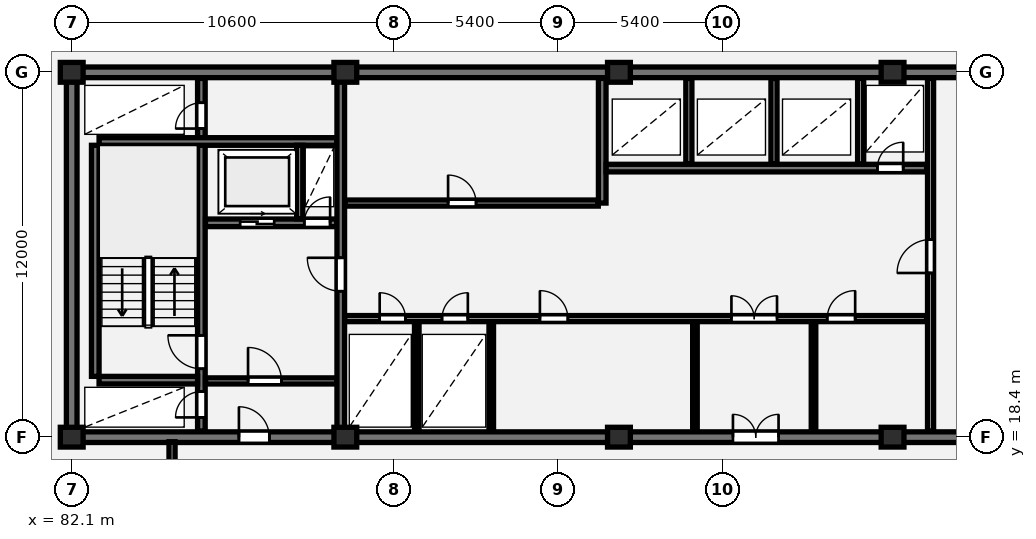
"""IFC4 building model, lengths in metres.
Left out: names, types, materials, properties, quantities, classifications, styles, units other than length and angle.
Written with IfcOpenShell. Run it as: python <this file> out.ifc"""

import sys

from ifc_helpers import new_model, si_unit, direction, frame, frame_2d, origin, origin_2d, place, context, subcontext, project, spatial, rectangle, extrude, element, fill, save


model = new_model("IFC4")
c1 = context("Model", 3, precision=1e-05, world=origin(), true_north=direction((0.0, 1.0)))
c2 = subcontext(c1, "Body", "Model", "MODEL_VIEW")
j1 = project(units=[si_unit("LENGTHUNIT", "METRE"), si_unit("PLANEANGLEUNIT", "RADIAN")], contexts=[c1])
p1 = place(None, origin())
s1 = spatial("IfcSite", under=j1, at=p1, CompositionType="ELEMENT")
p2 = place(p1, origin())
s2 = spatial("IfcBuilding", under=s1, at=p2, CompositionType="ELEMENT")
p3 = place(p2, frame((0.0, 0.0, 204.35)))
s3 = spatial("IfcBuildingStorey", under=s2, at=p3, CompositionType="ELEMENT", Elevation=204.35)
for number, where, z_axis, x_axis in (
    (1, (82.1, 18.4, 0.0), (0.0, 0.0, 1.0), (1.0, 0.0, 0.0)),
    (2, (82.1, 30.4, 0.0), (0.0, 0.0, 1.0), (1.0, 0.0, 0.0)),
    (3, (91.1, 18.4, 0.0), (0.0, 0.0, 1.0), (1.0, 0.0, 0.0)),
    (4, (91.1, 30.4, 0.0), (0.0, 0.0, 1.0), (1.0, 0.0, 0.0)),
    (5, (100.1, 18.4, 0.0), (0.0, 0.0, 1.0), (1.0, 0.0, 0.0)),
    (6, (100.1, 30.4, 0.0), (0.0, 0.0, 1.0), (1.0, 0.0, 0.0)),
    (7, (109.1, 18.4, 0.0), (0.0, 0.0, 1.0), (1.0, 0.0, 0.0)),
    (8, (109.1, 30.4, 0.0), (0.0, 0.0, 1.0), (1.0, 0.0, 0.0)),
):
    element("IfcColumn", number, at=place(p3, frame(where, z_axis=z_axis, x_axis=x_axis)), inside=s3, PredefinedType="COLUMN", context=c2, shape_type="SweptSolid", body=[
        extrude(rectangle(XDim=0.75, YDim=0.65, at=origin_2d()), origin(), (0.0, 0.0, 1.0), 3.25),
    ])
p4 = place(p3, frame((81.925, 30.4, 0.0), z_axis=(0.0, 0.0, 1.0), x_axis=(1.0, 0.0, 0.0)))
e9 = element("IfcWall", 9, at=p4, inside=s3, PredefinedType="SHEAR", context=c2, shape_type="SweptSolid", body=[
    extrude(rectangle(XDim=36.265, YDim=0.35, at=frame_2d((18.132, 0.0))), origin(), (0.0, 0.0, 1.0), 3.25),
])
p5 = place(p3, frame((82.1, 18.575, 0.0), z_axis=(0.0, 0.0, 1.0), x_axis=(0.0, 1.0, 0.0)))
e10 = element("IfcWall", 10, at=p5, inside=s3, PredefinedType="SHEAR", context=c2, shape_type="SweptSolid", body=[
    extrude(rectangle(XDim=11.65, YDim=0.35, at=frame_2d((5.825, 0.0))), origin(), (0.0, 0.0, 1.0), 3.25),
])
p6 = place(p3, frame((81.925, 18.4, 0.0), z_axis=(0.0, 0.0, 1.0), x_axis=(1.0, 0.0, 0.0)))
e11 = element("IfcWall", 11, at=p6, inside=s3, PredefinedType="SHEAR", context=c2, shape_type="SweptSolid", body=[
    extrude(rectangle(XDim=36.265, YDim=0.35, at=frame_2d((18.132, 0.0))), origin(), (0.0, 0.0, 1.0), 3.25),
])
p7 = place(p6, frame((5.675, 0.0, 0.0)))
e12 = element("IfcOpeningElement", 12, at=p7, cuts=e11, PredefinedType="OPENING", context=c2, shape_type="SweptSolid", body=[
    extrude(rectangle(XDim=1.0, YDim=2.15, at=frame_2d((0.5, 1.075))), frame((0.0, 0.185, 0.0), z_axis=(0.0, -1.0, 0.0), x_axis=(1.0, 0.0, 0.0)), (0.0, 0.0, 1.0), 0.37),
])
p8 = place(p6, frame((21.925, 0.0, 0.0)))
e13 = element("IfcOpeningElement", 13, at=p8, cuts=e11, PredefinedType="OPENING", context=c2, shape_type="SweptSolid", body=[
    extrude(rectangle(XDim=1.5, YDim=2.2, at=frame_2d((0.75, 1.1))), frame((0.0, 0.185, 0.0), z_axis=(0.0, -1.0, 0.0), x_axis=(1.0, 0.0, 0.0)), (0.0, 0.0, 1.0), 0.37),
])
p9 = place(p6, frame((29.875, 0.0, 0.0)))
e14 = element("IfcOpeningElement", 14, at=p9, cuts=e11, PredefinedType="OPENING", context=c2, shape_type="SweptSolid", body=[
    extrude(rectangle(XDim=1.0, YDim=2.15, at=frame_2d((0.5, 1.075))), frame((0.0, 0.185, 0.0), z_axis=(0.0, -1.0, 0.0), x_axis=(1.0, 0.0, 0.0)), (0.0, 0.0, 1.0), 0.37),
])
p10 = place(p3, frame((82.875, 20.4, 0.0), z_axis=(0.0, 0.0, 1.0), x_axis=(0.0, 1.0, 0.0)))
e15 = element("IfcWall", 15, at=p10, inside=s3, PredefinedType="SHEAR", context=c2, shape_type="SweptSolid", body=[
    extrude(rectangle(XDim=7.6, YDim=0.25, at=frame_2d((3.8, 0.0))), origin(), (0.0, 0.0, 1.0), 3.25),
])
p11 = place(p3, frame((86.365, 18.6, 0.0), z_axis=(0.0, 0.0, 1.0), x_axis=(0.0, 1.0, 0.0)))
e16 = element("IfcWall", 16, at=p11, inside=s3, PredefinedType="SHEAR", context=c2, shape_type="SweptSolid", body=[
    extrude(rectangle(XDim=11.6, YDim=0.25, at=frame_2d((5.8, 0.0))), origin(), (0.0, 0.0, 1.0), 3.25),
])
p12 = place(p11, frame((0.45, 0.0, 0.0)))
e17 = element("IfcOpeningElement", 17, at=p12, cuts=e16, PredefinedType="OPENING", context=c2, shape_type="SweptSolid", body=[
    extrude(rectangle(XDim=0.85, YDim=2.05, at=frame_2d((0.425, 1.025))), frame((0.0, 0.135, 0.0), z_axis=(0.0, -1.0, 0.0), x_axis=(1.0, 0.0, 0.0)), (0.0, 0.0, 1.0), 0.27),
])
p13 = place(p11, frame((2.05, 0.0, 0.0)))
e18 = element("IfcOpeningElement", 18, at=p13, cuts=e16, PredefinedType="OPENING", context=c2, shape_type="SweptSolid", body=[
    extrude(rectangle(XDim=1.1, YDim=2.1, at=frame_2d((0.55, 1.05))), frame((0.0, 0.135, 0.0), z_axis=(0.0, -1.0, 0.0), x_axis=(1.0, 0.0, 0.0)), (0.0, 0.0, 1.0), 0.27),
])
p14 = place(p11, frame((9.95, 0.0, 0.0)))
e19 = element("IfcOpeningElement", 19, at=p14, cuts=e16, PredefinedType="OPENING", context=c2, shape_type="SweptSolid", body=[
    extrude(rectangle(XDim=0.85, YDim=2.05, at=frame_2d((0.425, 1.025))), frame((0.0, 0.135, 0.0), z_axis=(0.0, -1.0, 0.0), x_axis=(1.0, 0.0, 0.0)), (0.0, 0.0, 1.0), 0.27),
])
p15 = place(p3, frame((83.0, 20.275, 0.0), z_axis=(0.0, 0.0, 1.0), x_axis=(1.0, 0.0, 0.0)))
e20 = element("IfcWall", 20, at=p15, inside=s3, PredefinedType="SHEAR", context=c2, shape_type="SweptSolid", body=[
    extrude(rectangle(XDim=3.24, YDim=0.25, at=frame_2d((1.62, 0.0))), origin(), (0.0, 0.0, 1.0), 3.25),
])
p16 = place(p3, frame((83.0, 28.125, 0.0), z_axis=(0.0, 0.0, 1.0), x_axis=(1.0, 0.0, 0.0)))
e21 = element("IfcWall", 21, at=p16, inside=s3, PredefinedType="SHEAR", context=c2, shape_type="SweptSolid", body=[
    extrude(rectangle(XDim=7.82, YDim=0.25, at=frame_2d((3.91, 0.0))), origin(), (0.0, 0.0, 1.0), 3.25),
])
p17 = place(p3, frame((86.5, 25.45, 0.0), z_axis=(0.0, 0.0, 1.0), x_axis=(1.0, 0.0, 0.0)))
e22 = element("IfcWall", 22, at=p17, inside=s3, PredefinedType="SHEAR", context=c2, shape_type="SweptSolid", body=[
    extrude(rectangle(XDim=4.32, YDim=0.25, at=frame_2d((2.16, 0.0))), origin(), (0.0, 0.0, 1.0), 3.25),
])
p18 = place(p17, frame((1.14, 0.0, 0.0)))
e23 = element("IfcOpeningElement", 23, at=p18, cuts=e22, PredefinedType="OPENING", context=c2, shape_type="SweptSolid", body=[
    extrude(rectangle(XDim=1.12, YDim=2.12, at=frame_2d((0.56, 1.06))), frame((0.0, 0.135, 0.0), z_axis=(0.0, -1.0, 0.0), x_axis=(1.0, 0.0, 0.0)), (0.0, 0.0, 1.0), 0.27),
])
p19 = place(p17, frame((3.25, 0.0, 0.0)))
e24 = element("IfcOpeningElement", 24, at=p19, cuts=e22, PredefinedType="OPENING", context=c2, shape_type="SweptSolid", body=[
    extrude(rectangle(XDim=0.85, YDim=2.05, at=frame_2d((0.425, 1.025))), frame((0.0, 0.135, 0.0), z_axis=(0.0, -1.0, 0.0), x_axis=(1.0, 0.0, 0.0)), (0.0, 0.0, 1.0), 0.27),
])
p20 = place(p3, frame((89.6, 25.58, 0.0), z_axis=(0.0, 0.0, 1.0), x_axis=(0.0, 1.0, 0.0)))
e25 = element("IfcWall", 25, at=p20, inside=s3, PredefinedType="PARTITIONING", context=c2, shape_type="SweptSolid", body=[
    extrude(rectangle(XDim=2.42, YDim=0.2, at=frame_2d((1.21, 0.0))), origin(), (0.0, 0.0, 1.0), 2.98),
])
p21 = place(p3, frame((86.5, 20.25, 0.0), z_axis=(0.0, 0.0, 1.0), x_axis=(1.0, 0.0, 0.0)))
e26 = element("IfcWall", 26, at=p21, inside=s3, PredefinedType="PARTITIONING", context=c2, shape_type="SweptSolid", body=[
    extrude(rectangle(XDim=4.32, YDim=0.2, at=frame_2d((2.16, 0.0))), origin(), (0.0, 0.0, 1.0), 2.98),
])
p22 = place(p21, frame((1.4, 0.0, 0.0)))
e27 = element("IfcOpeningElement", 27, at=p22, cuts=e26, PredefinedType="OPENING", context=c2, shape_type="SweptSolid", body=[
    extrude(rectangle(XDim=1.1, YDim=2.1, at=frame_2d((0.55, 1.05))), frame((0.0, 0.11, 0.0), z_axis=(0.0, -1.0, 0.0), x_axis=(1.0, 0.0, 0.0)), (0.0, 0.0, 1.0), 0.22),
])
p23 = place(p3, frame((90.95, 18.6, 0.0), z_axis=(0.0, 0.0, 1.0), x_axis=(0.0, 1.0, 0.0)))
e28 = element("IfcWall", 28, at=p23, inside=s3, PredefinedType="SHEAR", context=c2, shape_type="SweptSolid", body=[
    extrude(rectangle(XDim=11.6, YDim=0.25, at=frame_2d((5.8, 0.0))), origin(), (0.0, 0.0, 1.0), 3.25),
])
p24 = place(p23, frame((4.6, 0.0, 0.0)))
e29 = element("IfcOpeningElement", 29, at=p24, cuts=e28, PredefinedType="OPENING", context=c2, shape_type="SweptSolid", body=[
    extrude(rectangle(XDim=1.1, YDim=2.1, at=frame_2d((0.55, 1.05))), frame((0.0, 0.135, 0.0), z_axis=(0.0, -1.0, 0.0), x_axis=(1.0, 0.0, 0.0)), (0.0, 0.0, 1.0), 0.27),
])
p25 = place(p3, frame((91.08, 26.1, 0.0), z_axis=(0.0, 0.0, 1.0), x_axis=(1.0, 0.0, 0.0)))
e30 = element("IfcWall", 30, at=p25, inside=s3, PredefinedType="PARTITIONING", context=c2, shape_type="SweptSolid", body=[
    extrude(rectangle(XDim=8.34, YDim=0.2, at=frame_2d((4.17, 0.0))), origin(), (0.0, 0.0, 1.0), 2.98),
])
p26 = place(p25, frame((3.4, 0.0, 0.0)))
e31 = element("IfcOpeningElement", 31, at=p26, cuts=e30, PredefinedType="OPENING", context=c2, shape_type="SweptSolid", body=[
    extrude(rectangle(XDim=0.92, YDim=2.08, at=frame_2d((0.46, 1.04))), frame((0.0, 0.11, 0.0), z_axis=(0.0, -1.0, 0.0), x_axis=(1.0, 0.0, 0.0)), (0.0, 0.0, 1.0), 0.22),
])
p27 = place(p3, frame((99.55, 26.1, 0.0), z_axis=(0.0, 0.0, 1.0), x_axis=(0.0, 1.0, 0.0)))
e32 = element("IfcWall", 32, at=p27, inside=s3, PredefinedType="SHEAR", context=c2, shape_type="SweptSolid", body=[
    extrude(rectangle(XDim=4.1, YDim=0.25, at=frame_2d((2.05, 0.0))), origin(), (0.0, 0.0, 1.0), 3.25),
])
for number, where, z_axis, x_axis in (
    (33, (102.4, 27.38, 0.0), (0.0, 0.0, 1.0), (0.0, 1.0, 0.0)),
    (34, (105.2, 27.38, 0.0), (0.0, 0.0, 1.0), (0.0, 1.0, 0.0)),
    (35, (108.05, 27.38, 0.0), (0.0, 0.0, 1.0), (0.0, 1.0, 0.0)),
):
    element("IfcWall", number, at=place(p3, frame(where, z_axis=z_axis, x_axis=x_axis)), inside=s3, PredefinedType="PARTITIONING", context=c2, shape_type="SweptSolid", body=[
        extrude(rectangle(XDim=2.82, YDim=0.2, at=frame_2d((1.41, 0.0))), origin(), (0.0, 0.0, 1.0), 2.98),
    ])
p28 = place(p3, frame((99.68, 27.25, 0.0), z_axis=(0.0, 0.0, 1.0), x_axis=(1.0, 0.0, 0.0)))
e36 = element("IfcWall", 36, at=p28, inside=s3, PredefinedType="SHEAR", context=c2, shape_type="SweptSolid", body=[
    extrude(rectangle(XDim=10.54, YDim=0.25, at=frame_2d((5.27, 0.0))), origin(), (0.0, 0.0, 1.0), 3.25),
])
p29 = place(p28, frame((8.92, 0.0, 0.0)))
e37 = element("IfcOpeningElement", 37, at=p29, cuts=e36, PredefinedType="OPENING", context=c2, shape_type="SweptSolid", body=[
    extrude(rectangle(XDim=0.85, YDim=2.05, at=frame_2d((0.425, 1.025))), frame((0.0, 0.135, 0.0), z_axis=(0.0, -1.0, 0.0), x_axis=(1.0, 0.0, 0.0)), (0.0, 0.0, 1.0), 0.27),
])
for number, where, z_axis, x_axis in (
    (38, (93.45, 18.6, 0.0), (0.0, 0.0, 1.0), (0.0, 1.0, 0.0)),
    (39, (95.9, 18.6, 0.0), (0.0, 0.0, 1.0), (0.0, 1.0, 0.0)),
    (40, (102.6, 18.6, 0.0), (0.0, 0.0, 1.0), (0.0, 1.0, 0.0)),
    (41, (106.5, 18.6, 0.0), (0.0, 0.0, 1.0), (0.0, 1.0, 0.0)),
):
    element("IfcWall", number, at=place(p3, frame(where, z_axis=z_axis, x_axis=x_axis)), inside=s3, PredefinedType="PARTITIONING", context=c2, shape_type="SweptSolid", body=[
        extrude(rectangle(XDim=3.6, YDim=0.15, at=frame_2d((1.8, 0.0))), origin(), (0.0, 0.0, 1.0), 2.98),
    ])
p30 = place(p3, frame((91.08, 22.3, 0.0), z_axis=(0.0, 0.0, 1.0), x_axis=(1.0, 0.0, 0.0)))
e42 = element("IfcWall", 42, at=p30, inside=s3, PredefinedType="PARTITIONING", context=c2, shape_type="SweptSolid", body=[
    extrude(rectangle(XDim=19.14, YDim=0.2, at=frame_2d((9.57, 0.0))), origin(), (0.0, 0.0, 1.0), 2.98),
])
p31 = place(p30, frame((1.15, 0.0, 0.0)))
e43 = element("IfcOpeningElement", 43, at=p31, cuts=e42, PredefinedType="OPENING", context=c2, shape_type="SweptSolid", body=[
    extrude(rectangle(XDim=0.85, YDim=2.05, at=frame_2d((0.425, 1.025))), frame((0.0, 0.11, 0.0), z_axis=(0.0, -1.0, 0.0), x_axis=(1.0, 0.0, 0.0)), (0.0, 0.0, 1.0), 0.22),
])
p32 = place(p30, frame((3.2, 0.0, 0.0)))
e44 = element("IfcOpeningElement", 44, at=p32, cuts=e42, PredefinedType="OPENING", context=c2, shape_type="SweptSolid", body=[
    extrude(rectangle(XDim=0.85, YDim=2.05, at=frame_2d((0.425, 1.025))), frame((0.0, 0.11, 0.0), z_axis=(0.0, -1.0, 0.0), x_axis=(1.0, 0.0, 0.0)), (0.0, 0.0, 1.0), 0.22),
])
p33 = place(p30, frame((12.72, 0.0, 0.0)))
e45 = element("IfcOpeningElement", 45, at=p33, cuts=e42, PredefinedType="OPENING", context=c2, shape_type="SweptSolid", body=[
    extrude(rectangle(XDim=1.5, YDim=2.2, at=frame_2d((0.75, 1.1))), frame((0.0, 0.11, 0.0), z_axis=(0.0, -1.0, 0.0), x_axis=(1.0, 0.0, 0.0)), (0.0, 0.0, 1.0), 0.22),
])
p34 = place(p30, frame((6.42, 0.0, 0.0)))
e46 = element("IfcOpeningElement", 46, at=p34, cuts=e42, PredefinedType="OPENING", context=c2, shape_type="SweptSolid", body=[
    extrude(rectangle(XDim=0.92, YDim=2.08, at=frame_2d((0.46, 1.04))), frame((0.0, 0.11, 0.0), z_axis=(0.0, -1.0, 0.0), x_axis=(1.0, 0.0, 0.0)), (0.0, 0.0, 1.0), 0.22),
])
p35 = place(p30, frame((15.87, 0.0, 0.0)))
e47 = element("IfcOpeningElement", 47, at=p35, cuts=e42, PredefinedType="OPENING", context=c2, shape_type="SweptSolid", body=[
    extrude(rectangle(XDim=0.92, YDim=2.08, at=frame_2d((0.46, 1.04))), frame((0.0, 0.11, 0.0), z_axis=(0.0, -1.0, 0.0), x_axis=(1.0, 0.0, 0.0)), (0.0, 0.0, 1.0), 0.22),
])
p36 = place(p3, frame((110.35, 18.6, 0.0), z_axis=(0.0, 0.0, 1.0), x_axis=(0.0, 1.0, 0.0)))
e48 = element("IfcWall", 48, at=p36, inside=s3, PredefinedType="PARTITIONING", context=c2, shape_type="SweptSolid", body=[
    extrude(rectangle(XDim=11.6, YDim=0.2, at=frame_2d((5.8, 0.0))), origin(), (0.0, 0.0, 1.0), 2.98),
])
p37 = place(p36, frame((5.2, 0.0, 0.0)))
e49 = element("IfcOpeningElement", 49, at=p37, cuts=e48, PredefinedType="OPENING", context=c2, shape_type="SweptSolid", body=[
    extrude(rectangle(XDim=1.1, YDim=2.15, at=frame_2d((0.55, 1.075))), frame((0.0, 0.11, 0.0), z_axis=(0.0, -1.0, 0.0), x_axis=(1.0, 0.0, 0.0)), (0.0, 0.0, 1.0), 0.22),
])
p38 = place(p3, frame((85.4, 10.5, 0.0), z_axis=(0.0, 0.0, 1.0), x_axis=(0.0, 1.0, 0.0)))
e50 = element("IfcWall", 50, at=p38, inside=s3, PredefinedType="PARTITIONING", context=c2, shape_type="SweptSolid", body=[
    extrude(rectangle(XDim=7.75, YDim=0.2, at=frame_2d((3.875, 0.0))), origin(), (0.0, 0.0, 1.0), 2.98),
])
p39 = place(p7, origin())
e51 = element("IfcDoor", 51, at=p39, inside=s3, OperationType="SINGLE_SWING_LEFT", PredefinedType="DOOR", context=c2, shape_type="SweptSolid", body=[
    extrude(rectangle(XDim=1.0, YDim=2.15, at=frame_2d((0.5, 1.075))), frame((0.0, 0.025, 0.0), z_axis=(0.0, -1.0, 0.0), x_axis=(1.0, 0.0, 0.0)), (0.0, 0.0, 1.0), 0.05),
])
fill(e12, e51)
p40 = place(p8, origin())
e52 = element("IfcDoor", 52, at=p40, inside=s3, OperationType="DOUBLE_DOOR_SINGLE_SWING", PredefinedType="DOOR", context=c2, shape_type="SweptSolid", body=[
    extrude(rectangle(XDim=1.5, YDim=2.2, at=frame_2d((0.75, 1.1))), frame((0.0, 0.025, 0.0), z_axis=(0.0, -1.0, 0.0), x_axis=(1.0, 0.0, 0.0)), (0.0, 0.0, 1.0), 0.05),
])
fill(e13, e52)
p41 = place(p12, origin())
e53 = element("IfcDoor", 53, at=p41, inside=s3, OperationType="SINGLE_SWING_LEFT", PredefinedType="DOOR", context=c2, shape_type="SweptSolid", body=[
    extrude(rectangle(XDim=0.85, YDim=2.05, at=frame_2d((0.425, 1.025))), frame((0.0, 0.025, 0.0), z_axis=(0.0, -1.0, 0.0), x_axis=(1.0, 0.0, 0.0)), (0.0, 0.0, 1.0), 0.05),
])
fill(e17, e53)
p42 = place(p13, origin())
e54 = element("IfcDoor", 54, at=p42, inside=s3, OperationType="SINGLE_SWING_RIGHT", PredefinedType="DOOR", context=c2, shape_type="SweptSolid", body=[
    extrude(rectangle(XDim=1.1, YDim=2.1, at=frame_2d((0.55, 1.05))), frame((0.0, 0.025, 0.0), z_axis=(0.0, -1.0, 0.0), x_axis=(1.0, 0.0, 0.0)), (0.0, 0.0, 1.0), 0.05),
])
fill(e18, e54)
p43 = place(p14, origin())
e55 = element("IfcDoor", 55, at=p43, inside=s3, OperationType="SINGLE_SWING_LEFT", PredefinedType="DOOR", context=c2, shape_type="SweptSolid", body=[
    extrude(rectangle(XDim=0.85, YDim=2.05, at=frame_2d((0.425, 1.025))), frame((0.0, 0.025, 0.0), z_axis=(0.0, -1.0, 0.0), x_axis=(1.0, 0.0, 0.0)), (0.0, 0.0, 1.0), 0.05),
])
fill(e19, e55)
p44 = place(p18, origin())
e56 = element("IfcDoor", 56, at=p44, inside=s3, OperationType="SLIDING_TO_RIGHT", PredefinedType="DOOR", context=c2, shape_type="SweptSolid", body=[
    extrude(rectangle(XDim=1.12, YDim=2.12, at=frame_2d((0.56, 1.06))), frame((0.0, 0.025, 0.0), z_axis=(0.0, -1.0, 0.0), x_axis=(1.0, 0.0, 0.0)), (0.0, 0.0, 1.0), 0.05),
])
fill(e23, e56)
p45 = place(p19, origin())
e57 = element("IfcDoor", 57, at=p45, inside=s3, OperationType="SINGLE_SWING_RIGHT", PredefinedType="DOOR", context=c2, shape_type="SweptSolid", body=[
    extrude(rectangle(XDim=0.85, YDim=2.05, at=frame_2d((0.425, 1.025))), frame((0.0, 0.025, 0.0), z_axis=(0.0, -1.0, 0.0), x_axis=(1.0, 0.0, 0.0)), (0.0, 0.0, 1.0), 0.05),
])
fill(e24, e57)
p46 = place(p22, origin())
e58 = element("IfcDoor", 58, at=p46, inside=s3, OperationType="SINGLE_SWING_LEFT", PredefinedType="DOOR", context=c2, shape_type="SweptSolid", body=[
    extrude(rectangle(XDim=1.1, YDim=2.1, at=frame_2d((0.55, 1.05))), frame((0.0, 0.025, 0.0), z_axis=(0.0, -1.0, 0.0), x_axis=(1.0, 0.0, 0.0)), (0.0, 0.0, 1.0), 0.05),
])
fill(e27, e58)
p47 = place(p24, origin())
e59 = element("IfcDoor", 59, at=p47, inside=s3, OperationType="SINGLE_SWING_RIGHT", PredefinedType="DOOR", context=c2, shape_type="SweptSolid", body=[
    extrude(rectangle(XDim=1.1, YDim=2.1, at=frame_2d((0.55, 1.05))), frame((0.0, 0.025, 0.0), z_axis=(0.0, -1.0, 0.0), x_axis=(1.0, 0.0, 0.0)), (0.0, 0.0, 1.0), 0.05),
])
fill(e29, e59)
p48 = place(p26, origin())
e60 = element("IfcDoor", 60, at=p48, inside=s3, OperationType="SINGLE_SWING_LEFT", PredefinedType="DOOR", context=c2, shape_type="SweptSolid", body=[
    extrude(rectangle(XDim=0.92, YDim=2.08, at=frame_2d((0.46, 1.04))), frame((0.0, 0.025, 0.0), z_axis=(0.0, -1.0, 0.0), x_axis=(1.0, 0.0, 0.0)), (0.0, 0.0, 1.0), 0.05),
])
fill(e31, e60)
p49 = place(p29, origin())
e61 = element("IfcDoor", 61, at=p49, inside=s3, OperationType="SINGLE_SWING_RIGHT", PredefinedType="DOOR", context=c2, shape_type="SweptSolid", body=[
    extrude(rectangle(XDim=0.85, YDim=2.05, at=frame_2d((0.425, 1.025))), frame((0.0, 0.025, 0.0), z_axis=(0.0, -1.0, 0.0), x_axis=(1.0, 0.0, 0.0)), (0.0, 0.0, 1.0), 0.05),
])
fill(e37, e61)
p50 = place(p31, origin())
e62 = element("IfcDoor", 62, at=p50, inside=s3, OperationType="SINGLE_SWING_LEFT", PredefinedType="DOOR", context=c2, shape_type="SweptSolid", body=[
    extrude(rectangle(XDim=0.85, YDim=2.05, at=frame_2d((0.425, 1.025))), frame((0.0, 0.025, 0.0), z_axis=(0.0, -1.0, 0.0), x_axis=(1.0, 0.0, 0.0)), (0.0, 0.0, 1.0), 0.05),
])
fill(e43, e62)
p51 = place(p32, origin())
e63 = element("IfcDoor", 63, at=p51, inside=s3, OperationType="SINGLE_SWING_RIGHT", PredefinedType="DOOR", context=c2, shape_type="SweptSolid", body=[
    extrude(rectangle(XDim=0.85, YDim=2.05, at=frame_2d((0.425, 1.025))), frame((0.0, 0.025, 0.0), z_axis=(0.0, -1.0, 0.0), x_axis=(1.0, 0.0, 0.0)), (0.0, 0.0, 1.0), 0.05),
])
fill(e44, e63)
p52 = place(p33, origin())
e64 = element("IfcDoor", 64, at=p52, inside=s3, OperationType="DOUBLE_DOOR_SINGLE_SWING", PredefinedType="DOOR", context=c2, shape_type="SweptSolid", body=[
    extrude(rectangle(XDim=1.5, YDim=2.2, at=frame_2d((0.75, 1.1))), frame((0.0, 0.025, 0.0), z_axis=(0.0, -1.0, 0.0), x_axis=(1.0, 0.0, 0.0)), (0.0, 0.0, 1.0), 0.05),
])
fill(e45, e64)
p53 = place(p34, origin())
e65 = element("IfcDoor", 65, at=p53, inside=s3, OperationType="SINGLE_SWING_LEFT", PredefinedType="DOOR", context=c2, shape_type="SweptSolid", body=[
    extrude(rectangle(XDim=0.92, YDim=2.08, at=frame_2d((0.46, 1.04))), frame((0.0, 0.025, 0.0), z_axis=(0.0, -1.0, 0.0), x_axis=(1.0, 0.0, 0.0)), (0.0, 0.0, 1.0), 0.05),
])
fill(e46, e65)
p54 = place(p35, origin())
e66 = element("IfcDoor", 66, at=p54, inside=s3, OperationType="SINGLE_SWING_RIGHT", PredefinedType="DOOR", context=c2, shape_type="SweptSolid", body=[
    extrude(rectangle(XDim=0.92, YDim=2.08, at=frame_2d((0.46, 1.04))), frame((0.0, 0.025, 0.0), z_axis=(0.0, -1.0, 0.0), x_axis=(1.0, 0.0, 0.0)), (0.0, 0.0, 1.0), 0.05),
])
fill(e47, e66)
p55 = place(p37, origin())
e67 = element("IfcDoor", 67, at=p55, inside=s3, OperationType="SINGLE_SWING_LEFT", PredefinedType="DOOR", context=c2, shape_type="SweptSolid", body=[
    extrude(rectangle(XDim=1.1, YDim=2.15, at=frame_2d((0.55, 1.075))), frame((0.0, 0.025, 0.0), z_axis=(0.0, -1.0, 0.0), x_axis=(1.0, 0.0, 0.0)), (0.0, 0.0, 1.0), 0.05),
])
fill(e49, e67)
save(model, sys.argv[1])
